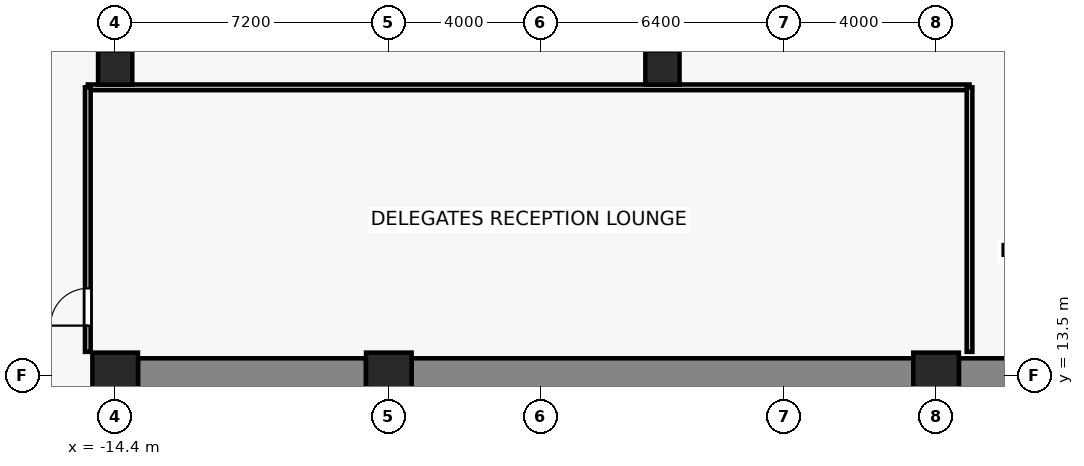
"""IFC4 building model, lengths in metres.
Left out: names, types, materials, properties, quantities, classifications, styles, units other than length and angle.
Written with IfcOpenShell. Run it as: python <this file> out.ifc"""

import sys

from ifc_helpers import new_model, si_unit, direction, frame, frame_2d, origin, origin_2d, place, context, subcontext, project, spatial, rectangle, extrude, source, transform, mapped, element, fill, save


model = new_model("IFC4")
c1 = context("Model", 3, precision=1e-05, world=origin(), true_north=direction((0.0, 1.0)))
c2 = subcontext(c1, "Body", "Model", "MODEL_VIEW")
j1 = project(units=[si_unit("LENGTHUNIT", "METRE"), si_unit("PLANEANGLEUNIT", "RADIAN")], contexts=[c1])
p1 = place(None, origin())
s1 = spatial("IfcSite", under=j1, at=p1, CompositionType="ELEMENT")
p2 = place(p1, origin())
s2 = spatial("IfcBuilding", under=s1, at=p2, CompositionType="ELEMENT")
p3 = place(p2, frame((0.0, 0.0, 13.8)))
s3 = spatial("IfcBuildingStorey", under=s2, at=p3, CompositionType="ELEMENT", Elevation=13.8)
for number, where, z_axis, x_axis in (
    (1, (-14.4, 13.5, 0.0), (0.0, 0.0, 1.0), (1.0, 0.0, 0.0)),
    (2, (-7.2, 13.5, 0.0), (0.0, 0.0, 1.0), (1.0, 0.0, 0.0)),
    (3, (7.2, 13.5, 0.0), (0.0, 0.0, 1.0), (1.0, 0.0, 0.0)),
):
    element("IfcColumn", number, at=place(p3, frame(where, z_axis=z_axis, x_axis=x_axis)), inside=s3, PredefinedType="COLUMN", context=c2, shape_type="SweptSolid", body=[
        extrude(rectangle(XDim=1.2, YDim=1.2, at=origin_2d()), origin(), (0.0, 0.0, 1.0), 4.4),
    ])
for number, where, z_axis, x_axis in (
    (4, (-14.4, 21.6, 0.0), (0.0, 0.0, 1.0), (1.0, 0.0, 0.0)),
    (5, (0.0, 21.6, 0.0), (0.0, 0.0, 1.0), (1.0, 0.0, 0.0)),
):
    element("IfcColumn", number, at=place(p3, frame(where, z_axis=z_axis, x_axis=x_axis)), inside=s3, PredefinedType="COLUMN", context=c2, shape_type="SweptSolid", body=[
        extrude(rectangle(XDim=0.9, YDim=0.9, at=origin_2d()), origin(), (0.0, 0.0, 1.0), 4.4),
    ])
p4 = place(p3, frame((-13.8, 13.5, 0.0), z_axis=(0.0, 0.0, 1.0), x_axis=(1.0, 0.0, 0.0)))
e6 = element("IfcWall", 6, at=p4, inside=s3, PredefinedType="SHEAR", context=c2, shape_type="SweptSolid", body=[
    extrude(rectangle(XDim=6.0, YDim=0.9, at=frame_2d((3.0, 0.0))), origin(), (0.0, 0.0, 1.0), 4.1),
])
p5 = place(p3, frame((-6.6, 13.5, 0.0), z_axis=(0.0, 0.0, 1.0), x_axis=(1.0, 0.0, 0.0)))
e7 = element("IfcWall", 7, at=p5, inside=s3, PredefinedType="SHEAR", context=c2, shape_type="SweptSolid", body=[
    extrude(rectangle(XDim=13.2, YDim=0.9, at=frame_2d((6.6, 0.0))), origin(), (0.0, 0.0, 1.0), 4.1),
])
p6 = place(p3, frame((7.8, 13.5, 0.0), z_axis=(0.0, 0.0, 1.0), x_axis=(1.0, 0.0, 0.0)))
e8 = element("IfcWall", 8, at=p6, inside=s3, PredefinedType="SHEAR", context=c2, shape_type="SweptSolid", body=[
    extrude(rectangle(XDim=6.0, YDim=0.9, at=frame_2d((3.0, 0.0))), origin(), (0.0, 0.0, 1.0), 4.1),
])
p7 = place(p3, frame((-15.12, 21.08, 0.0), z_axis=(0.0, 0.0, 1.0), x_axis=(1.0, 0.0, 0.0)))
e9 = element("IfcWall", 9, at=p7, inside=s3, PredefinedType="PARTITIONING", context=c2, shape_type="SweptSolid", body=[
    extrude(rectangle(XDim=23.2, YDim=0.15, at=frame_2d((11.6, 0.0))), origin(), (0.0, 0.0, 1.0), 3.19),
])
p8 = place(p3, frame((-15.12, 14.12, 0.0), z_axis=(0.0, 0.0, 1.0), x_axis=(0.0, 1.0, 0.0)))
e10 = element("IfcWall", 10, at=p8, inside=s3, PredefinedType="PARTITIONING", context=c2, shape_type="SweptSolid", body=[
    extrude(rectangle(XDim=6.96, YDim=0.15, at=frame_2d((3.48, 0.0))), origin(), (0.0, 0.0, 1.0), 3.473),
])
p9 = place(p8, frame((0.69, 0.0, 0.0)))
e11 = element("IfcOpeningElement", 11, at=p9, cuts=e10, PredefinedType="OPENING", context=c2, shape_type="SweptSolid", body=[
    extrude(rectangle(XDim=0.98, YDim=2.15, at=frame_2d((0.49, 1.075))), frame((0.0, 0.085, 0.0), z_axis=(0.0, -1.0, 0.0), x_axis=(1.0, 0.0, 0.0)), (0.0, 0.0, 1.0), 0.17),
])
p10 = place(p3, frame((8.08, 21.08, 0.0), z_axis=(0.0, 0.0, 1.0), x_axis=(0.0, -1.0, 0.0)))
e12 = element("IfcWall", 12, at=p10, inside=s3, PredefinedType="PARTITIONING", context=c2, shape_type="SweptSolid", body=[
    extrude(rectangle(XDim=6.96, YDim=0.15, at=frame_2d((3.48, 0.0))), origin(), (0.0, 0.0, 1.0), 3.473),
])
m1 = source(origin(), c2, "Body", "SweptSolid", [
    extrude(rectangle(XDim=0.98, YDim=2.15, at=frame_2d((0.49, 1.075))), frame((0.0, 0.025, 0.0), z_axis=(0.0, -1.0, 0.0), x_axis=(1.0, 0.0, 0.0)), (0.0, 0.0, 1.0), 0.05),
])
p11 = place(p9, origin())
e13 = element("IfcDoor", 13, at=p11, inside=s3, OperationType="SINGLE_SWING_LEFT", PredefinedType="DOOR", context=c2, shape_type="MappedRepresentation", body=[
    mapped(m1, transform((0.0, 0.0, 0.0), x_axis=(1.0, 0.0, 0.0), y_axis=(0.0, 1.0, 0.0), z_axis=(0.0, 0.0, 1.0), scale=1.0)),
])
fill(e11, e13)
save(model, sys.argv[1])
